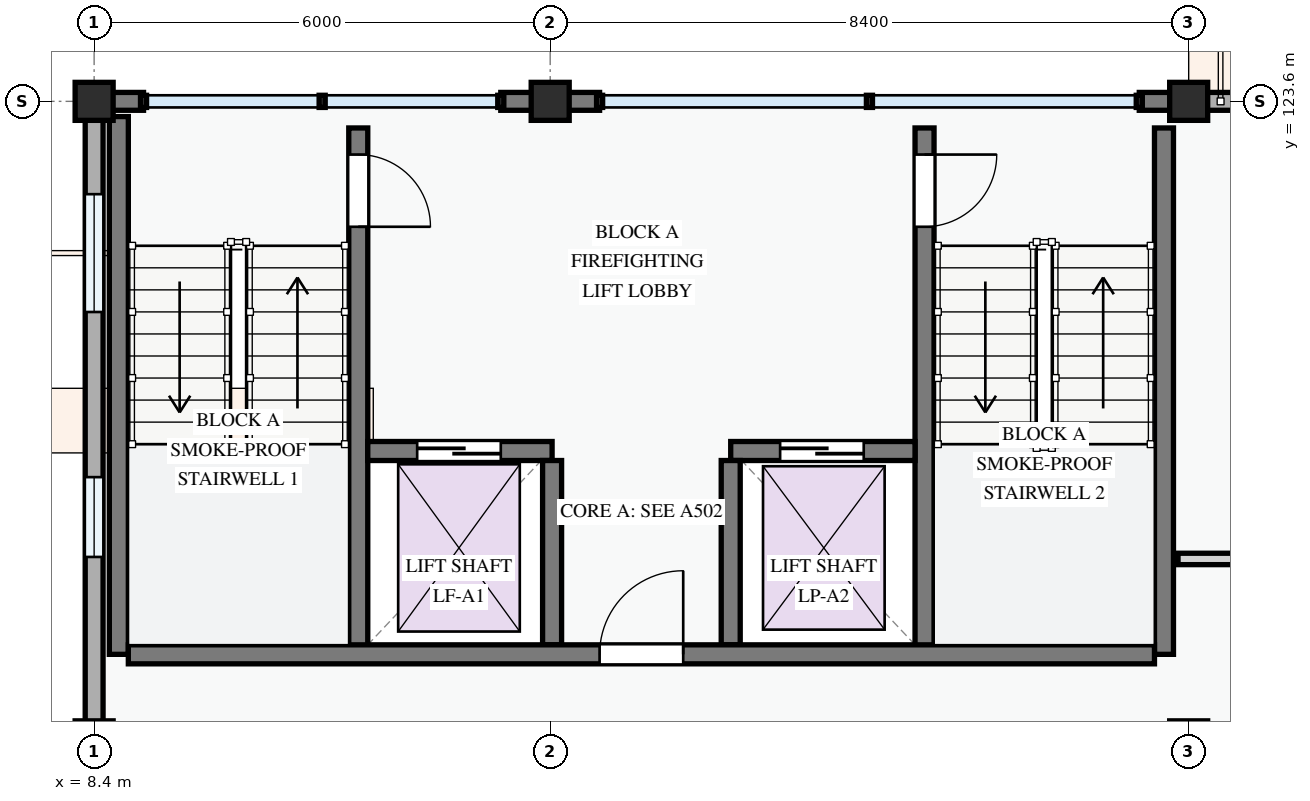
"""IFC4 building model, lengths in metres.
Left out: names, types, materials, properties, quantities, classifications, styles, units other than length and angle.
Written with IfcOpenShell. Run it as: python <this file> out.ifc"""

import sys

from ifc_helpers import new_model, si_unit, direction, frame, frame_2d, origin, origin_2d, place, context, subcontext, project, spatial, rectangle, extrude, element, fill, save


model = new_model("IFC4")
c1 = context("Model", 3, precision=1e-05, world=origin(), true_north=direction((0.0, 1.0)))
c2 = subcontext(c1, "Body", "Model", "MODEL_VIEW")
j1 = project(units=[si_unit("LENGTHUNIT", "METRE"), si_unit("PLANEANGLEUNIT", "RADIAN")], contexts=[c1])
p1 = place(None, origin())
s1 = spatial("IfcSite", under=j1, at=p1, CompositionType="ELEMENT")
p2 = place(p1, origin())
s2 = spatial("IfcBuilding", under=s1, at=p2, CompositionType="ELEMENT")
p3 = place(p2, frame((0.0, 0.0, 44.4)))
s3 = spatial("IfcBuildingStorey", under=s2, at=p3, CompositionType="ELEMENT", Elevation=44.4)
for number, where, z_axis, x_axis in (
    (1, (8.4, 123.6, 0.0), (0.0, 0.0, 1.0), (1.0, 0.0, 0.0)),
    (2, (14.4, 123.6, 0.0), (0.0, 0.0, 1.0), (1.0, 0.0, 0.0)),
    (3, (22.8, 123.6, 0.0), (0.0, 0.0, 1.0), (1.0, 0.0, 0.0)),
):
    element("IfcColumn", number, at=place(p3, frame(where, z_axis=z_axis, x_axis=x_axis)), inside=s3, PredefinedType="COLUMN", context=c2, shape_type="SweptSolid", body=[
        extrude(rectangle(XDim=0.5, YDim=0.5, at=origin_2d()), origin(), (0.0, 0.0, 1.0), 3.3),
    ])
p4 = place(p3, frame((28.8, 123.6, 0.0), z_axis=(0.0, 0.0, 1.0), x_axis=(-1.0, 0.0, 0.0)))
e4 = element("IfcWall", 4, at=p4, inside=s3, PredefinedType="STANDARD", context=c2, shape_type="SweptSolid", body=[
    extrude(rectangle(XDim=6.0, YDim=0.235, at=frame_2d((3.0, 0.0))), origin(), (0.0, 0.0, 1.0), 2.525),
])
p5 = place(p4, frame((0.62, 0.0, 0.0)))
e5 = element("IfcOpeningElement", 5, at=p5, cuts=e4, PredefinedType="OPENING", context=c2, shape_type="SweptSolid", body=[
    extrude(rectangle(XDim=1.5, YDim=2.2, at=frame_2d((0.75, 1.1))), frame((0.0, 0.127, 0.0), z_axis=(0.0, -1.0, 0.0), x_axis=(1.0, 0.0, 0.0)), (0.0, 0.0, 1.0), 0.255),
])
p6 = place(p4, frame((2.9, 0.0, 0.78)))
e6 = element("IfcOpeningElement", 6, at=p6, cuts=e4, PredefinedType="OPENING", context=c2, shape_type="SweptSolid", body=[
    extrude(rectangle(XDim=2.18, YDim=1.48, at=frame_2d((1.09, 0.74))), frame((0.0, 0.127, 0.0), z_axis=(0.0, -1.0, 0.0), x_axis=(1.0, 0.0, 0.0)), (0.0, 0.0, 1.0), 0.255),
])
for number, where, z_axis, x_axis in (
    (7, (22.8, 123.6, 0.0), (0.0, 0.0, 1.0), (-1.0, 0.0, 0.0)),
    (8, (15.05, 123.6, 0.0), (0.0, 0.0, 1.0), (-1.0, 0.0, 0.0)),
):
    element("IfcWall", number, at=place(p3, frame(where, z_axis=z_axis, x_axis=x_axis)), inside=s3, PredefinedType="STANDARD", context=c2, shape_type="SweptSolid", body=[
        extrude(rectangle(XDim=0.65, YDim=0.235, at=frame_2d((0.325, 0.0))), origin(), (0.0, 0.0, 1.0), 3.04),
    ])
p7 = place(p3, frame((14.4, 123.6, 0.0), z_axis=(0.0, 0.0, 1.0), x_axis=(-1.0, 0.0, 0.0)))
e9 = element("IfcWall", 9, at=p7, inside=s3, PredefinedType="STANDARD", context=c2, shape_type="SweptSolid", body=[
    extrude(rectangle(XDim=0.65, YDim=0.235, at=frame_2d((0.325, 0.0))), origin(), (0.0, 0.0, 1.0), 3.04),
])
p8 = place(p3, frame((9.05, 123.6, 0.0), z_axis=(0.0, 0.0, 1.0), x_axis=(-1.0, 0.0, 0.0)))
e10 = element("IfcWall", 10, at=p8, inside=s3, PredefinedType="STANDARD", context=c2, shape_type="SweptSolid", body=[
    extrude(rectangle(XDim=0.531, YDim=0.235, at=frame_2d((0.265, 0.0))), origin(), (0.0, 0.0, 1.0), 3.04),
])
p9 = place(p3, frame((8.4, 123.6, 0.0), z_axis=(0.0, 0.0, 1.0), x_axis=(0.0, -1.0, 0.0)))
e11 = element("IfcWall", 11, at=p9, inside=s3, PredefinedType="STANDARD", context=c2, shape_type="SweptSolid", body=[
    extrude(rectangle(XDim=8.4, YDim=0.235, at=frame_2d((4.2, 0.0))), origin(), (0.0, 0.0, 1.0), 2.425),
])
p10 = place(p9, frame((1.221, 0.0, 0.78)))
e12 = element("IfcOpeningElement", 12, at=p10, cuts=e11, PredefinedType="OPENING", context=c2, shape_type="SweptSolid", body=[
    extrude(rectangle(XDim=1.55, YDim=1.4, at=frame_2d((0.775, 0.7))), frame((0.0, 0.127, 0.0), z_axis=(0.0, -1.0, 0.0), x_axis=(1.0, 0.0, 0.0)), (0.0, 0.0, 1.0), 0.255),
])
p11 = place(p9, frame((4.944, 0.0, 0.78)))
e13 = element("IfcOpeningElement", 13, at=p11, cuts=e11, PredefinedType="OPENING", context=c2, shape_type="SweptSolid", body=[
    extrude(rectangle(XDim=1.05, YDim=1.2, at=frame_2d((0.525, 0.6))), frame((0.0, 0.127, 0.0), z_axis=(0.0, -1.0, 0.0), x_axis=(1.0, 0.0, 0.0)), (0.0, 0.0, 1.0), 0.255),
])
p12 = place(p3, frame((11.875, 123.25, 0.0), z_axis=(0.0, 0.0, 1.0), x_axis=(0.0, -1.0, 0.0)))
e14 = element("IfcWall", 14, at=p12, inside=s3, PredefinedType="SHEAR", context=c2, shape_type="SweptSolid", body=[
    extrude(rectangle(XDim=6.925, YDim=0.25, at=frame_2d((3.462, 0.0))), origin(), (0.0, 0.0, 1.0), 3.0),
])
p13 = place(p12, frame((0.35, 0.0, 0.0)))
e15 = element("IfcOpeningElement", 15, at=p13, cuts=e14, PredefinedType="OPENING", context=c2, shape_type="SweptSolid", body=[
    extrude(rectangle(XDim=0.95, YDim=2.1, at=frame_2d((0.475, 1.05))), frame((0.0, 0.135, 0.0), z_axis=(0.0, -1.0, 0.0), x_axis=(1.0, 0.0, 0.0)), (0.0, 0.0, 1.0), 0.27),
])
p14 = place(p3, frame((8.725, 123.4, 0.0), z_axis=(0.0, 0.0, 1.0), x_axis=(0.0, -1.0, 0.0)))
e16 = element("IfcWall", 16, at=p14, inside=s3, PredefinedType="SHEAR", context=c2, shape_type="SweptSolid", body=[
    extrude(rectangle(XDim=7.075, YDim=0.25, at=frame_2d((3.538, 0.0))), origin(), (0.0, 0.0, 1.0), 3.0),
])
p15 = place(p3, frame((22.475, 123.25, 0.0), z_axis=(0.0, 0.0, 1.0), x_axis=(0.0, -1.0, 0.0)))
e17 = element("IfcWall", 17, at=p15, inside=s3, PredefinedType="SHEAR", context=c2, shape_type="SweptSolid", body=[
    extrude(rectangle(XDim=6.925, YDim=0.25, at=frame_2d((3.462, 0.0))), origin(), (0.0, 0.0, 1.0), 3.0),
])
p16 = place(p3, frame((19.325, 123.25, 0.0), z_axis=(0.0, 0.0, 1.0), x_axis=(0.0, -1.0, 0.0)))
e18 = element("IfcWall", 18, at=p16, inside=s3, PredefinedType="SHEAR", context=c2, shape_type="SweptSolid", body=[
    extrude(rectangle(XDim=6.925, YDim=0.25, at=frame_2d((3.462, 0.0))), origin(), (0.0, 0.0, 1.0), 3.0),
])
p17 = place(p16, frame((0.35, 0.0, 0.0)))
e19 = element("IfcOpeningElement", 19, at=p17, cuts=e18, PredefinedType="OPENING", context=c2, shape_type="SweptSolid", body=[
    extrude(rectangle(XDim=0.95, YDim=2.1, at=frame_2d((0.475, 1.05))), frame((0.0, 0.135, 0.0), z_axis=(0.0, -1.0, 0.0), x_axis=(1.0, 0.0, 0.0)), (0.0, 0.0, 1.0), 0.27),
])
p18 = place(p3, frame((12.0, 119.0, 0.0), z_axis=(0.0, 0.0, 1.0), x_axis=(1.0, 0.0, 0.0)))
e20 = element("IfcWall", 20, at=p18, inside=s3, PredefinedType="SHEAR", context=c2, shape_type="SweptSolid", body=[
    extrude(rectangle(XDim=2.425, YDim=0.25, at=frame_2d((1.212, 0.0))), origin(), (0.0, 0.0, 1.0), 3.0),
])
p19 = place(p18, frame((0.65, 0.0, 0.0)))
e21 = element("IfcOpeningElement", 21, at=p19, cuts=e20, PredefinedType="OPENING", context=c2, shape_type="SweptSolid", body=[
    extrude(rectangle(XDim=1.1, YDim=2.15, at=frame_2d((0.55, 1.075))), frame((0.0, 0.135, 0.0), z_axis=(0.0, -1.0, 0.0), x_axis=(1.0, 0.0, 0.0)), (0.0, 0.0, 1.0), 0.27),
])
p20 = place(p3, frame((16.775, 119.0, 0.0), z_axis=(0.0, 0.0, 1.0), x_axis=(1.0, 0.0, 0.0)))
e22 = element("IfcWall", 22, at=p20, inside=s3, PredefinedType="SHEAR", context=c2, shape_type="SweptSolid", body=[
    extrude(rectangle(XDim=2.425, YDim=0.25, at=frame_2d((1.212, 0.0))), origin(), (0.0, 0.0, 1.0), 3.0),
])
p21 = place(p20, frame((0.65, 0.0, 0.0)))
e23 = element("IfcOpeningElement", 23, at=p21, cuts=e22, PredefinedType="OPENING", context=c2, shape_type="SweptSolid", body=[
    extrude(rectangle(XDim=1.1, YDim=2.15, at=frame_2d((0.55, 1.075))), frame((0.0, 0.135, 0.0), z_axis=(0.0, -1.0, 0.0), x_axis=(1.0, 0.0, 0.0)), (0.0, 0.0, 1.0), 0.27),
])
for number, where, z_axis, x_axis in (
    (24, (14.425, 118.875, 0.0), (0.0, 0.0, 1.0), (0.0, -1.0, 0.0)),
    (25, (16.775, 118.875, 0.0), (0.0, 0.0, 1.0), (0.0, -1.0, 0.0)),
):
    element("IfcWall", number, at=place(p3, frame(where, z_axis=z_axis, x_axis=x_axis)), inside=s3, PredefinedType="SHEAR", context=c2, shape_type="SweptSolid", body=[
        extrude(rectangle(XDim=2.425, YDim=0.25, at=frame_2d((1.212, 0.0))), origin(), (0.0, 0.0, 1.0), 3.0),
    ])
p22 = place(p3, frame((8.85, 116.325, 0.0), z_axis=(0.0, 0.0, 1.0), x_axis=(1.0, 0.0, 0.0)))
e26 = element("IfcWall", 26, at=p22, inside=s3, PredefinedType="SHEAR", context=c2, shape_type="SweptSolid", body=[
    extrude(rectangle(XDim=13.5, YDim=0.25, at=frame_2d((6.75, 0.0))), origin(), (0.0, 0.0, 1.0), 3.0),
])
p23 = place(p22, frame((6.2, 0.0, 0.0)))
e27 = element("IfcOpeningElement", 27, at=p23, cuts=e26, PredefinedType="OPENING", context=c2, shape_type="SweptSolid", body=[
    extrude(rectangle(XDim=1.1, YDim=2.15, at=frame_2d((0.55, 1.075))), frame((0.0, 0.135, 0.0), z_axis=(0.0, -1.0, 0.0), x_axis=(1.0, 0.0, 0.0)), (0.0, 0.0, 1.0), 0.27),
])
p24 = place(p3, frame((22.66, 117.58, 0.0), z_axis=(0.0, 0.0, 1.0), x_axis=(1.0, 0.0, 0.0)))
e28 = element("IfcWall", 28, at=p24, inside=s3, PredefinedType="PARTITIONING", context=c2, shape_type="SweptSolid", body=[
    extrude(rectangle(XDim=14.48, YDim=0.15, at=frame_2d((7.24, 0.0))), origin(), (0.0, 0.0, 1.0), 3.0),
])
p25 = place(p24, frame((2.74, 0.0, 0.0)))
e29 = element("IfcOpeningElement", 29, at=p25, cuts=e28, PredefinedType="OPENING", context=c2, shape_type="SweptSolid", body=[
    extrude(rectangle(XDim=0.92, YDim=2.1, at=frame_2d((0.46, 1.05))), frame((0.0, 0.085, 0.0), z_axis=(0.0, -1.0, 0.0), x_axis=(1.0, 0.0, 0.0)), (0.0, 0.0, 1.0), 0.17),
])
p26 = place(p10, origin())
e30 = element("IfcWindow", 30, at=p26, inside=s3, PartitioningType="SINGLE_PANEL", PredefinedType="WINDOW", context=c2, shape_type="SweptSolid", body=[
    extrude(rectangle(XDim=1.55, YDim=1.4, at=frame_2d((0.775, 0.7))), frame((0.0, 0.03, 0.0), z_axis=(0.0, -1.0, 0.0), x_axis=(1.0, 0.0, 0.0)), (0.0, 0.0, 1.0), 0.06),
])
fill(e12, e30)
p27 = place(p11, origin())
e31 = element("IfcWindow", 31, at=p27, inside=s3, PartitioningType="SINGLE_PANEL", PredefinedType="WINDOW", context=c2, shape_type="SweptSolid", body=[
    extrude(rectangle(XDim=1.05, YDim=1.2, at=frame_2d((0.525, 0.6))), frame((0.0, 0.03, 0.0), z_axis=(0.0, -1.0, 0.0), x_axis=(1.0, 0.0, 0.0)), (0.0, 0.0, 1.0), 0.06),
])
fill(e13, e31)
p28 = place(p13, origin())
e32 = element("IfcDoor", 32, at=p28, inside=s3, OperationType="SINGLE_SWING_RIGHT", PredefinedType="DOOR", context=c2, shape_type="SweptSolid", body=[
    extrude(rectangle(XDim=0.95, YDim=2.1, at=frame_2d((0.475, 1.05))), frame((0.0, 0.025, 0.0), z_axis=(0.0, -1.0, 0.0), x_axis=(1.0, 0.0, 0.0)), (0.0, 0.0, 1.0), 0.05),
])
fill(e15, e32)
p29 = place(p17, origin())
e33 = element("IfcDoor", 33, at=p29, inside=s3, OperationType="SINGLE_SWING_LEFT", PredefinedType="DOOR", context=c2, shape_type="SweptSolid", body=[
    extrude(rectangle(XDim=0.95, YDim=2.1, at=frame_2d((0.475, 1.05))), frame((0.0, 0.025, 0.0), z_axis=(0.0, -1.0, 0.0), x_axis=(1.0, 0.0, 0.0)), (0.0, 0.0, 1.0), 0.05),
])
fill(e19, e33)
p30 = place(p19, origin())
e34 = element("IfcDoor", 34, at=p30, inside=s3, OperationType="SLIDING_TO_LEFT", PredefinedType="DOOR", context=c2, shape_type="SweptSolid", body=[
    extrude(rectangle(XDim=1.1, YDim=2.15, at=frame_2d((0.55, 1.075))), frame((0.0, 0.025, 0.0), z_axis=(0.0, -1.0, 0.0), x_axis=(1.0, 0.0, 0.0)), (0.0, 0.0, 1.0), 0.05),
])
fill(e21, e34)
p31 = place(p21, origin())
e35 = element("IfcDoor", 35, at=p31, inside=s3, OperationType="SLIDING_TO_LEFT", PredefinedType="DOOR", context=c2, shape_type="SweptSolid", body=[
    extrude(rectangle(XDim=1.1, YDim=2.15, at=frame_2d((0.55, 1.075))), frame((0.0, 0.025, 0.0), z_axis=(0.0, -1.0, 0.0), x_axis=(1.0, 0.0, 0.0)), (0.0, 0.0, 1.0), 0.05),
])
fill(e23, e35)
p32 = place(p23, origin())
e36 = element("IfcDoor", 36, at=p32, inside=s3, OperationType="SINGLE_SWING_RIGHT", PredefinedType="DOOR", context=c2, shape_type="SweptSolid", body=[
    extrude(rectangle(XDim=1.1, YDim=2.15, at=frame_2d((0.55, 1.075))), frame((0.0, 0.025, 0.0), z_axis=(0.0, -1.0, 0.0), x_axis=(1.0, 0.0, 0.0)), (0.0, 0.0, 1.0), 0.05),
])
fill(e27, e36)
save(model, sys.argv[1])
